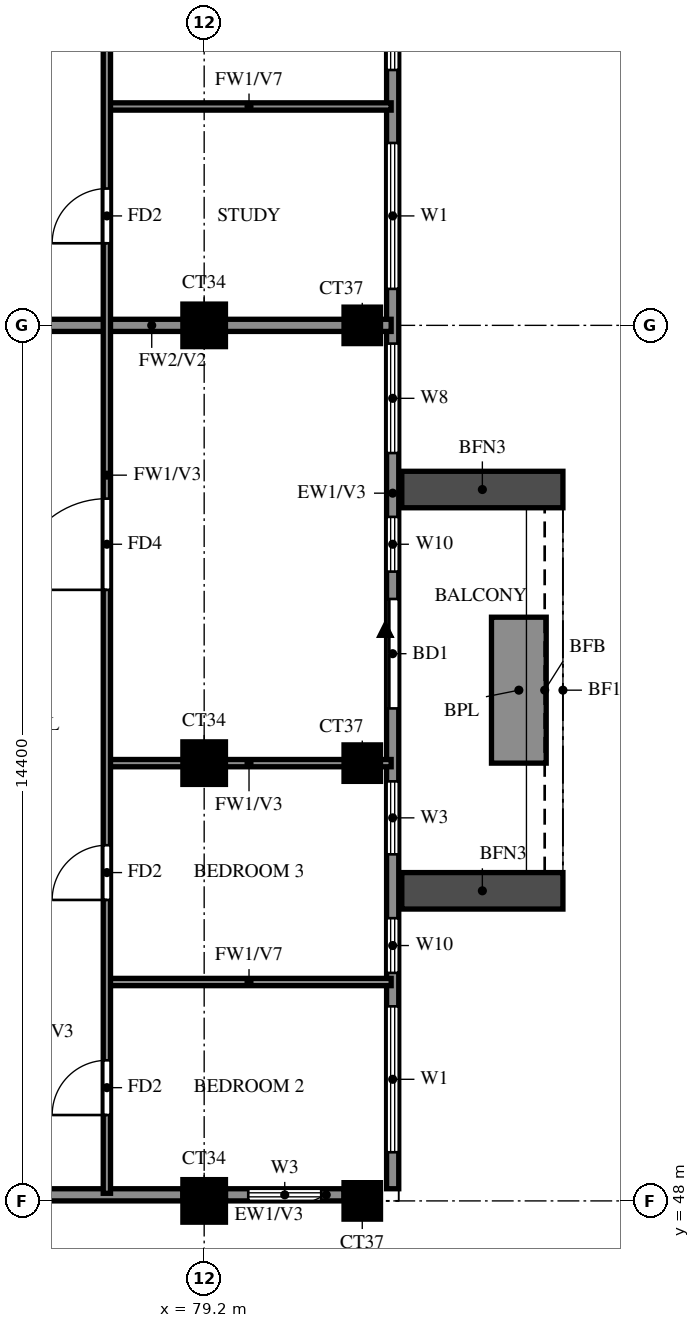
"""IFC4 building model, lengths in metres.
Left out: names, types, materials, properties, quantities, classifications, styles, units other than length and angle.
Written with IfcOpenShell. Run it as: python <this file> out.ifc"""

import sys

from ifc_helpers import new_model, si_unit, direction, frame, frame_2d, origin, origin_2d, place, context, subcontext, project, spatial, rectangle, extrude, source, transform, mapped, element, fill, save


model = new_model("IFC4")
c1 = context("Model", 3, precision=1e-05, world=origin(), true_north=direction((0.0, 1.0)))
c2 = subcontext(c1, "Body", "Model", "MODEL_VIEW")
j1 = project(units=[si_unit("LENGTHUNIT", "METRE"), si_unit("PLANEANGLEUNIT", "RADIAN")], contexts=[c1])
p1 = place(None, origin())
s1 = spatial("IfcSite", under=j1, at=p1, CompositionType="ELEMENT")
p2 = place(p1, origin())
s2 = spatial("IfcBuilding", under=s1, at=p2, CompositionType="ELEMENT")
p3 = place(p2, frame((0.0, 0.0, 260.5)))
s3 = spatial("IfcBuildingStorey", under=s2, at=p3, CompositionType="ELEMENT", Elevation=260.5)
m1 = source(origin(), c2, "Body", "SweptSolid", [
    extrude(rectangle(XDim=0.7, YDim=0.7, at=origin_2d()), origin(), (0.0, 0.0, 1.0), 3.22),
])
p4 = place(p3, frame((79.2, 48.0, 0.0), z_axis=(0.0, 0.0, 1.0), x_axis=(1.0, 0.0, 0.0)))
e1 = element("IfcColumn", 1, at=p4, inside=s3, PredefinedType="COLUMN", context=c2, shape_type="MappedRepresentation", body=[
    mapped(m1, transform((0.0, 0.0, 0.0))),
])
m2 = source(origin(), c2, "Body", "SweptSolid", [
    extrude(rectangle(XDim=0.6, YDim=0.6, at=origin_2d()), origin(), (0.0, 0.0, 1.0), 3.22),
])
p5 = place(p3, frame((81.8, 48.0, 0.0), z_axis=(0.0, 0.0, 1.0), x_axis=(1.0, 0.0, 0.0)))
e2 = element("IfcColumn", 2, at=p5, inside=s3, PredefinedType="COLUMN", context=c2, shape_type="MappedRepresentation", body=[
    mapped(m2, transform((0.0, 0.0, 0.0))),
])
p6 = place(p3, frame((79.2, 55.2, 0.0), z_axis=(0.0, 0.0, 1.0), x_axis=(1.0, 0.0, 0.0)))
e3 = element("IfcColumn", 3, at=p6, inside=s3, PredefinedType="COLUMN", context=c2, shape_type="MappedRepresentation", body=[
    mapped(m1, transform((0.0, 0.0, 0.0))),
])
p7 = place(p3, frame((81.8, 55.2, 0.0), z_axis=(0.0, 0.0, 1.0), x_axis=(1.0, 0.0, 0.0)))
e4 = element("IfcColumn", 4, at=p7, inside=s3, PredefinedType="COLUMN", context=c2, shape_type="MappedRepresentation", body=[
    mapped(m2, transform((0.0, 0.0, 0.0))),
])
p8 = place(p3, frame((79.2, 62.4, 0.0), z_axis=(0.0, 0.0, 1.0), x_axis=(1.0, 0.0, 0.0)))
e5 = element("IfcColumn", 5, at=p8, inside=s3, PredefinedType="COLUMN", context=c2, shape_type="MappedRepresentation", body=[
    mapped(m1, transform((0.0, 0.0, 0.0))),
])
p9 = place(p3, frame((81.8, 62.4, 0.0), z_axis=(0.0, 0.0, 1.0), x_axis=(1.0, 0.0, 0.0)))
e6 = element("IfcColumn", 6, at=p9, inside=s3, PredefinedType="COLUMN", context=c2, shape_type="MappedRepresentation", body=[
    mapped(m2, transform((0.0, 0.0, 0.0))),
])
p10 = place(p3, frame((81.907, 39.87, 0.0), z_axis=(0.0, 0.0, 1.0), x_axis=(-0.777936274417, 0.62834318087, 0.0)))
e7 = element("IfcWall", 7, at=p10, inside=s3, PredefinedType="SOLIDWALL", context=c2, shape_type="SweptSolid", body=[
    extrude(rectangle(XDim=13.099, YDim=0.2, at=frame_2d((6.549, 0.0))), origin(), (0.0, 0.0, 1.0), 3.22),
])
p11 = place(p10, frame((9.938, 0.0, 1.5)))
e8 = element("IfcOpeningElement", 8, at=p11, cuts=e7, PredefinedType="OPENING", context=c2, shape_type="SweptSolid", body=[
    extrude(rectangle(XDim=0.9, YDim=0.9, at=frame_2d((0.45, 0.45))), frame((0.0, 0.11, 0.0), z_axis=(0.0, -1.0, 0.0), x_axis=(1.0, 0.0, 0.0)), (0.0, 0.0, 1.0), 0.22),
])
p12 = place(p3, frame((71.987, 48.1, 0.0), z_axis=(0.0, 0.0, 1.0), x_axis=(1.0, 0.0, 0.0)))
e9 = element("IfcWall", 9, at=p12, inside=s3, PredefinedType="SOLIDWALL", context=c2, shape_type="SweptSolid", body=[
    extrude(rectangle(XDim=6.863, YDim=0.2, at=frame_2d((3.432, 0.0))), origin(), (0.0, 0.0, 1.0), 3.22),
])
p13 = place(p3, frame((79.55, 48.1, 0.0), z_axis=(0.0, 0.0, 1.0), x_axis=(1.0, 0.0, 0.0)))
e10 = element("IfcWall", 10, at=p13, inside=s3, PredefinedType="SOLIDWALL", context=c2, shape_type="SweptSolid", body=[
    extrude(rectangle(XDim=1.95, YDim=0.2, at=frame_2d((0.975, 0.0))), origin(), (0.0, 0.0, 1.0), 3.22),
])
p14 = place(p13, frame((0.375, 0.0, 0.6)))
e11 = element("IfcOpeningElement", 11, at=p14, cuts=e10, PredefinedType="OPENING", context=c2, shape_type="SweptSolid", body=[
    extrude(rectangle(XDim=1.2, YDim=2.4, at=frame_2d((0.6, 1.2))), frame((0.0, 0.11, 0.0), z_axis=(0.0, -1.0, 0.0), x_axis=(1.0, 0.0, 0.0)), (0.0, 0.0, 1.0), 0.22),
])
p15 = place(p3, frame((82.3, 48.2, 0.0), z_axis=(0.0, 0.0, 1.0), x_axis=(0.0, 1.0, 0.0)))
e12 = element("IfcWall", 12, at=p15, inside=s3, PredefinedType="SOLIDWALL", context=c2, shape_type="SweptSolid", body=[
    extrude(rectangle(XDim=28.6, YDim=0.2, at=frame_2d((14.3, 0.0))), origin(), (0.0, 0.0, 1.0), 3.22),
])
p16 = place(p15, frame((7.9, 0.0, 0.0)))
e13 = element("IfcOpeningElement", 13, at=p16, cuts=e12, PredefinedType="OPENING", context=c2, shape_type="SweptSolid", body=[
    extrude(rectangle(XDim=1.8, YDim=2.4, at=frame_2d((0.9, 1.2))), frame((0.0, 0.11, 0.0), z_axis=(0.0, -1.0, 0.0), x_axis=(1.0, 0.0, 0.0)), (0.0, 0.0, 1.0), 0.22),
])
p17 = place(p15, frame((0.6, 0.0, 0.6)))
e14 = element("IfcOpeningElement", 14, at=p17, cuts=e12, PredefinedType="OPENING", context=c2, shape_type="SweptSolid", body=[
    extrude(rectangle(XDim=2.4, YDim=2.4, at=frame_2d((1.2, 1.2))), frame((0.0, 0.11, 0.0), z_axis=(0.0, -1.0, 0.0), x_axis=(1.0, 0.0, 0.0)), (0.0, 0.0, 1.0), 0.22),
])
p18 = place(p15, frame((3.55, 0.0, 0.6)))
e15 = element("IfcOpeningElement", 15, at=p18, cuts=e12, PredefinedType="OPENING", context=c2, shape_type="SweptSolid", body=[
    extrude(rectangle(XDim=0.9, YDim=2.4, at=frame_2d((0.45, 1.2))), frame((0.0, 0.11, 0.0), z_axis=(0.0, -1.0, 0.0), x_axis=(1.0, 0.0, 0.0)), (0.0, 0.0, 1.0), 0.22),
])
p19 = place(p15, frame((5.5, 0.0, 0.6)))
e16 = element("IfcOpeningElement", 16, at=p19, cuts=e12, PredefinedType="OPENING", context=c2, shape_type="SweptSolid", body=[
    extrude(rectangle(XDim=1.2, YDim=2.4, at=frame_2d((0.6, 1.2))), frame((0.0, 0.11, 0.0), z_axis=(0.0, -1.0, 0.0), x_axis=(1.0, 0.0, 0.0)), (0.0, 0.0, 1.0), 0.22),
])
p20 = place(p15, frame((10.15, 0.0, 0.6)))
e17 = element("IfcOpeningElement", 17, at=p20, cuts=e12, PredefinedType="OPENING", context=c2, shape_type="SweptSolid", body=[
    extrude(rectangle(XDim=0.9, YDim=2.4, at=frame_2d((0.45, 1.2))), frame((0.0, 0.11, 0.0), z_axis=(0.0, -1.0, 0.0), x_axis=(1.0, 0.0, 0.0)), (0.0, 0.0, 1.0), 0.22),
])
p21 = place(p15, frame((12.1, 0.0, 0.6)))
e18 = element("IfcOpeningElement", 18, at=p21, cuts=e12, PredefinedType="OPENING", context=c2, shape_type="SweptSolid", body=[
    extrude(rectangle(XDim=1.8, YDim=2.4, at=frame_2d((0.9, 1.2))), frame((0.0, 0.11, 0.0), z_axis=(0.0, -1.0, 0.0), x_axis=(1.0, 0.0, 0.0)), (0.0, 0.0, 1.0), 0.22),
])
p22 = place(p15, frame((14.8, 0.0, 0.6)))
e19 = element("IfcOpeningElement", 19, at=p22, cuts=e12, PredefinedType="OPENING", context=c2, shape_type="SweptSolid", body=[
    extrude(rectangle(XDim=2.4, YDim=2.4, at=frame_2d((1.2, 1.2))), frame((0.0, 0.11, 0.0), z_axis=(0.0, -1.0, 0.0), x_axis=(1.0, 0.0, 0.0)), (0.0, 0.0, 1.0), 0.22),
])
p23 = place(p15, frame((18.4, 0.0, 0.6)))
e20 = element("IfcOpeningElement", 20, at=p23, cuts=e12, PredefinedType="OPENING", context=c2, shape_type="SweptSolid", body=[
    extrude(rectangle(XDim=2.4, YDim=2.4, at=frame_2d((1.2, 1.2))), frame((0.0, 0.11, 0.0), z_axis=(0.0, -1.0, 0.0), x_axis=(1.0, 0.0, 0.0)), (0.0, 0.0, 1.0), 0.22),
])
p24 = place(p15, frame((22.75, 0.0, 1.5)))
e21 = element("IfcOpeningElement", 21, at=p24, cuts=e12, PredefinedType="OPENING", context=c2, shape_type="SweptSolid", body=[
    extrude(rectangle(XDim=0.9, YDim=0.9, at=frame_2d((0.45, 0.45))), frame((0.0, 0.11, 0.0), z_axis=(0.0, -1.0, 0.0), x_axis=(1.0, 0.0, 0.0)), (0.0, 0.0, 1.0), 0.22),
])
p25 = place(p15, frame((25.5, 0.0, 0.6)))
e22 = element("IfcOpeningElement", 22, at=p25, cuts=e12, PredefinedType="OPENING", context=c2, shape_type="SweptSolid", body=[
    extrude(rectangle(XDim=2.4, YDim=2.4, at=frame_2d((1.2, 1.2))), frame((0.0, 0.11, 0.0), z_axis=(0.0, -1.0, 0.0), x_axis=(1.0, 0.0, 0.0)), (0.0, 0.0, 1.0), 0.22),
])
for number, where, z_axis, x_axis in (
    (23, (82.45, 53.1, 0.0), (0.0, 0.0, 1.0), (1.0, 0.0, 0.0)),
    (24, (82.45, 59.7, 0.0), (0.0, 0.0, 1.0), (1.0, 0.0, 0.0)),
):
    element("IfcWall", number, at=place(p3, frame(where, z_axis=z_axis, x_axis=x_axis)), inside=s3, PredefinedType="SOLIDWALL", context=c2, shape_type="SweptSolid", body=[
        extrude(rectangle(XDim=2.65, YDim=0.6, at=frame_2d((1.325, 0.0))), origin(), (0.0, 0.0, 1.0), 2.85),
    ])
p26 = place(p3, frame((84.375, 55.2, 0.0), z_axis=(0.0, 0.0, 1.0), x_axis=(0.0, 1.0, 0.0)))
e25 = element("IfcWall", 25, at=p26, inside=s3, PredefinedType="SOLIDWALL", context=c2, shape_type="SweptSolid", body=[
    extrude(rectangle(XDim=2.4, YDim=0.9, at=frame_2d((1.2, 0.0))), origin(), (0.0, 0.0, 1.0), 0.9),
])
p27 = place(p3, frame((74.4, 62.4, 0.0), z_axis=(0.0, 0.0, 1.0), x_axis=(1.0, 0.0, 0.0)))
e26 = element("IfcWall", 26, at=p27, inside=s3, PredefinedType="SOLIDWALL", context=c2, shape_type="SweptSolid", body=[
    extrude(rectangle(XDim=7.875, YDim=0.2, at=frame_2d((3.938, 0.0))), origin(), (0.0, 0.0, 1.0), 3.22),
])
p28 = place(p3, frame((77.6, 51.6, 0.0), z_axis=(0.0, 0.0, 1.0), x_axis=(1.0, 0.0, 0.0)))
e27 = element("IfcWall", 27, at=p28, inside=s3, PredefinedType="PARTITIONING", context=c2, shape_type="SweptSolid", body=[
    extrude(rectangle(XDim=4.675, YDim=0.12, at=frame_2d((2.337, 0.0))), origin(), (0.0, 0.0, 1.0), 2.32),
])
p29 = place(p3, frame((77.6, 55.2, 0.0), z_axis=(0.0, 0.0, 1.0), x_axis=(1.0, 0.0, 0.0)))
e28 = element("IfcWall", 28, at=p29, inside=s3, PredefinedType="PARTITIONING", context=c2, shape_type="SweptSolid", body=[
    extrude(rectangle(XDim=4.675, YDim=0.12, at=frame_2d((2.337, 0.0))), origin(), (0.0, 0.0, 1.0), 3.22),
])
p30 = place(p3, frame((77.6, 66.0, 0.0), z_axis=(0.0, 0.0, 1.0), x_axis=(1.0, 0.0, 0.0)))
e29 = element("IfcWall", 29, at=p30, inside=s3, PredefinedType="PARTITIONING", context=c2, shape_type="SweptSolid", body=[
    extrude(rectangle(XDim=4.675, YDim=0.12, at=frame_2d((2.337, 0.0))), origin(), (0.0, 0.0, 1.0), 2.32),
])
p31 = place(p3, frame((77.6, 48.125, 0.0), z_axis=(0.0, 0.0, 1.0), x_axis=(0.0, 1.0, 0.0)))
e30 = element("IfcWall", 30, at=p31, inside=s3, PredefinedType="PARTITIONING", context=c2, shape_type="SweptSolid", body=[
    extrude(rectangle(XDim=21.475, YDim=0.12, at=frame_2d((10.738, 0.0))), origin(), (0.0, 0.0, 1.0), 3.22),
])
p32 = place(p31, frame((1.288, 0.0, 0.0)))
e31 = element("IfcOpeningElement", 31, at=p32, cuts=e30, PredefinedType="OPENING", context=c2, shape_type="SweptSolid", body=[
    extrude(rectangle(XDim=0.9, YDim=2.1, at=frame_2d((0.45, 1.05))), frame((0.0, 0.07, 0.0), z_axis=(0.0, -1.0, 0.0), x_axis=(1.0, 0.0, 0.0)), (0.0, 0.0, 1.0), 0.14),
])
p33 = place(p31, frame((4.825, 0.0, 0.0)))
e32 = element("IfcOpeningElement", 32, at=p33, cuts=e30, PredefinedType="OPENING", context=c2, shape_type="SweptSolid", body=[
    extrude(rectangle(XDim=0.9, YDim=2.1, at=frame_2d((0.45, 1.05))), frame((0.0, 0.07, 0.0), z_axis=(0.0, -1.0, 0.0), x_axis=(1.0, 0.0, 0.0)), (0.0, 0.0, 1.0), 0.14),
])
p34 = place(p31, frame((9.925, 0.0, 0.0)))
e33 = element("IfcOpeningElement", 33, at=p34, cuts=e30, PredefinedType="OPENING", context=c2, shape_type="SweptSolid", body=[
    extrude(rectangle(XDim=1.5, YDim=2.1, at=frame_2d((0.75, 1.05))), frame((0.0, 0.07, 0.0), z_axis=(0.0, -1.0, 0.0), x_axis=(1.0, 0.0, 0.0)), (0.0, 0.0, 1.0), 0.14),
])
p35 = place(p31, frame((15.625, 0.0, 0.0)))
e34 = element("IfcOpeningElement", 34, at=p35, cuts=e30, PredefinedType="OPENING", context=c2, shape_type="SweptSolid", body=[
    extrude(rectangle(XDim=0.9, YDim=2.1, at=frame_2d((0.45, 1.05))), frame((0.0, 0.07, 0.0), z_axis=(0.0, -1.0, 0.0), x_axis=(1.0, 0.0, 0.0)), (0.0, 0.0, 1.0), 0.14),
])
p36 = place(p31, frame((19.225, 0.0, 0.0)))
e35 = element("IfcOpeningElement", 35, at=p36, cuts=e30, PredefinedType="OPENING", context=c2, shape_type="SweptSolid", body=[
    extrude(rectangle(XDim=0.9, YDim=2.1, at=frame_2d((0.45, 1.05))), frame((0.0, 0.07, 0.0), z_axis=(0.0, -1.0, 0.0), x_axis=(1.0, 0.0, 0.0)), (0.0, 0.0, 1.0), 0.14),
])
p37 = place(p14, origin())
e36 = element("IfcWindow", 36, at=p37, inside=s3, PartitioningType="SINGLE_PANEL", PredefinedType="WINDOW", context=c2, shape_type="SweptSolid", body=[
    extrude(rectangle(XDim=1.2, YDim=2.4, at=frame_2d((0.6, 1.2))), frame((0.0, 0.03, 0.0), z_axis=(0.0, -1.0, 0.0), x_axis=(1.0, 0.0, 0.0)), (0.0, 0.0, 1.0), 0.06),
])
fill(e11, e36)
p38 = place(p16, origin())
e37 = element("IfcDoor", 37, at=p38, inside=s3, OperationType="DOUBLE_DOOR_SLIDING", PredefinedType="DOOR", context=c2, shape_type="SweptSolid", body=[
    extrude(rectangle(XDim=1.8, YDim=2.4, at=frame_2d((0.9, 1.2))), frame((0.0, 0.025, 0.0), z_axis=(0.0, -1.0, 0.0), x_axis=(1.0, 0.0, 0.0)), (0.0, 0.0, 1.0), 0.05),
])
fill(e13, e37)
p39 = place(p17, origin())
e38 = element("IfcWindow", 38, at=p39, inside=s3, PartitioningType="DOUBLE_PANEL_VERTICAL", PredefinedType="WINDOW", context=c2, shape_type="SweptSolid", body=[
    extrude(rectangle(XDim=2.4, YDim=2.4, at=frame_2d((1.2, 1.2))), frame((0.0, 0.03, 0.0), z_axis=(0.0, -1.0, 0.0), x_axis=(1.0, 0.0, 0.0)), (0.0, 0.0, 1.0), 0.06),
])
fill(e14, e38)
p40 = place(p18, origin())
e39 = element("IfcWindow", 39, at=p40, inside=s3, PartitioningType="SINGLE_PANEL", PredefinedType="WINDOW", context=c2, shape_type="SweptSolid", body=[
    extrude(rectangle(XDim=0.9, YDim=2.4, at=frame_2d((0.45, 1.2))), frame((0.0, 0.03, 0.0), z_axis=(0.0, -1.0, 0.0), x_axis=(1.0, 0.0, 0.0)), (0.0, 0.0, 1.0), 0.06),
])
fill(e15, e39)
p41 = place(p19, origin())
e40 = element("IfcWindow", 40, at=p41, inside=s3, PartitioningType="SINGLE_PANEL", PredefinedType="WINDOW", context=c2, shape_type="SweptSolid", body=[
    extrude(rectangle(XDim=1.2, YDim=2.4, at=frame_2d((0.6, 1.2))), frame((0.0, 0.03, 0.0), z_axis=(0.0, -1.0, 0.0), x_axis=(1.0, 0.0, 0.0)), (0.0, 0.0, 1.0), 0.06),
])
fill(e16, e40)
p42 = place(p20, origin())
e41 = element("IfcWindow", 41, at=p42, inside=s3, PartitioningType="SINGLE_PANEL", PredefinedType="WINDOW", context=c2, shape_type="SweptSolid", body=[
    extrude(rectangle(XDim=0.9, YDim=2.4, at=frame_2d((0.45, 1.2))), frame((0.0, 0.03, 0.0), z_axis=(0.0, -1.0, 0.0), x_axis=(1.0, 0.0, 0.0)), (0.0, 0.0, 1.0), 0.06),
])
fill(e17, e41)
p43 = place(p21, origin())
e42 = element("IfcWindow", 42, at=p43, inside=s3, PartitioningType="DOUBLE_PANEL_VERTICAL", PredefinedType="WINDOW", context=c2, shape_type="SweptSolid", body=[
    extrude(rectangle(XDim=1.8, YDim=2.4, at=frame_2d((0.9, 1.2))), frame((0.0, 0.03, 0.0), z_axis=(0.0, -1.0, 0.0), x_axis=(1.0, 0.0, 0.0)), (0.0, 0.0, 1.0), 0.06),
])
fill(e18, e42)
p44 = place(p22, origin())
e43 = element("IfcWindow", 43, at=p44, inside=s3, PartitioningType="DOUBLE_PANEL_VERTICAL", PredefinedType="WINDOW", context=c2, shape_type="SweptSolid", body=[
    extrude(rectangle(XDim=2.4, YDim=2.4, at=frame_2d((1.2, 1.2))), frame((0.0, 0.03, 0.0), z_axis=(0.0, -1.0, 0.0), x_axis=(1.0, 0.0, 0.0)), (0.0, 0.0, 1.0), 0.06),
])
fill(e19, e43)
p45 = place(p23, origin())
e44 = element("IfcWindow", 44, at=p45, inside=s3, PartitioningType="DOUBLE_PANEL_VERTICAL", PredefinedType="WINDOW", context=c2, shape_type="SweptSolid", body=[
    extrude(rectangle(XDim=2.4, YDim=2.4, at=frame_2d((1.2, 1.2))), frame((0.0, 0.03, 0.0), z_axis=(0.0, -1.0, 0.0), x_axis=(1.0, 0.0, 0.0)), (0.0, 0.0, 1.0), 0.06),
])
fill(e20, e44)
p46 = place(p32, origin())
e45 = element("IfcDoor", 45, at=p46, inside=s3, OperationType="SINGLE_SWING_LEFT", PredefinedType="DOOR", context=c2, shape_type="SweptSolid", body=[
    extrude(rectangle(XDim=0.9, YDim=2.1, at=frame_2d((0.45, 1.05))), frame((0.0, 0.025, 0.0), z_axis=(0.0, -1.0, 0.0), x_axis=(1.0, 0.0, 0.0)), (0.0, 0.0, 1.0), 0.05),
])
fill(e31, e45)
p47 = place(p33, origin())
e46 = element("IfcDoor", 46, at=p47, inside=s3, OperationType="SINGLE_SWING_RIGHT", PredefinedType="DOOR", context=c2, shape_type="SweptSolid", body=[
    extrude(rectangle(XDim=0.9, YDim=2.1, at=frame_2d((0.45, 1.05))), frame((0.0, 0.025, 0.0), z_axis=(0.0, -1.0, 0.0), x_axis=(1.0, 0.0, 0.0)), (0.0, 0.0, 1.0), 0.05),
])
fill(e32, e46)
p48 = place(p34, origin())
e47 = element("IfcDoor", 47, at=p48, inside=s3, OperationType="SINGLE_SWING_LEFT", PredefinedType="DOOR", context=c2, shape_type="SweptSolid", body=[
    extrude(rectangle(XDim=1.5, YDim=2.1, at=frame_2d((0.75, 1.05))), frame((0.0, 0.025, 0.0), z_axis=(0.0, -1.0, 0.0), x_axis=(1.0, 0.0, 0.0)), (0.0, 0.0, 1.0), 0.05),
])
fill(e33, e47)
p49 = place(p35, origin())
e48 = element("IfcDoor", 48, at=p49, inside=s3, OperationType="SINGLE_SWING_LEFT", PredefinedType="DOOR", context=c2, shape_type="SweptSolid", body=[
    extrude(rectangle(XDim=0.9, YDim=2.1, at=frame_2d((0.45, 1.05))), frame((0.0, 0.025, 0.0), z_axis=(0.0, -1.0, 0.0), x_axis=(1.0, 0.0, 0.0)), (0.0, 0.0, 1.0), 0.05),
])
fill(e34, e48)
save(model, sys.argv[1])
